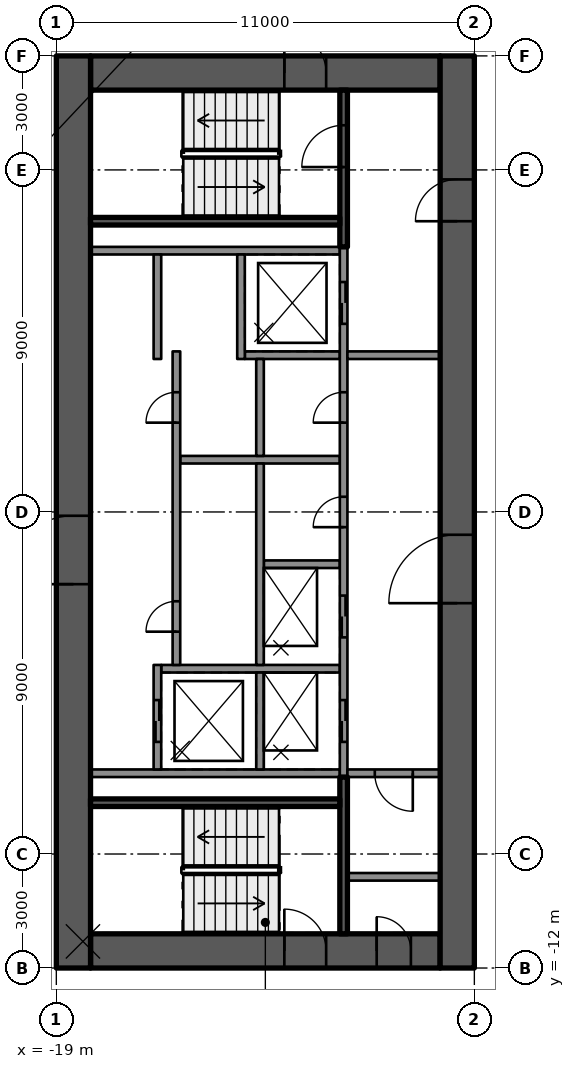
"""IFC4 building model, lengths in metres.
Left out: names, types, materials, properties, quantities, classifications, styles, units other than length and angle.
Written with IfcOpenShell. Run it as: python <this file> out.ifc"""

import sys

from ifc_helpers import new_model, si_unit, direction, frame, frame_2d, origin, place, context, subcontext, project, spatial, rectangle, extrude, element, fill, save


model = new_model("IFC4")
c1 = context("Model", 3, precision=1e-05, world=origin(), true_north=direction((0.0, 1.0)))
c2 = subcontext(c1, "Body", "Model", "MODEL_VIEW")
j1 = project(units=[si_unit("LENGTHUNIT", "METRE"), si_unit("PLANEANGLEUNIT", "RADIAN")], contexts=[c1])
p1 = place(None, origin())
s1 = spatial("IfcSite", under=j1, at=p1, CompositionType="ELEMENT")
p2 = place(p1, origin())
s2 = spatial("IfcBuilding", under=s1, at=p2, CompositionType="ELEMENT")
p3 = place(p2, frame((0.0, 0.0, 210.5)))
s3 = spatial("IfcBuildingStorey", under=s2, at=p3, CompositionType="ELEMENT", Elevation=210.5)
p4 = place(p3, frame((-18.1, 11.55, 0.0), z_axis=(0.0, 0.0, 1.0), x_axis=(1.0, 0.0, 0.0)))
e1 = element("IfcWall", 1, at=p4, inside=s3, PredefinedType="SHEAR", context=c2, shape_type="SweptSolid", body=[
    extrude(rectangle(XDim=9.2, YDim=0.9, at=frame_2d((4.6, 0.0))), origin(), (0.0, 0.0, 1.0), 3.5),
])
p5 = place(p4, frame((5.1, 0.0, 0.0)))
e2 = element("IfcOpeningElement", 2, at=p5, cuts=e1, PredefinedType="OPENING", context=c2, shape_type="SweptSolid", body=[
    extrude(rectangle(XDim=1.1, YDim=2.1, at=frame_2d((0.55, 1.05))), frame((0.0, 0.46, 0.0), z_axis=(0.0, -1.0, 0.0), x_axis=(1.0, 0.0, 0.0)), (0.0, 0.0, 1.0), 0.92),
])
p6 = place(p3, frame((-18.1, -11.55, 0.0), z_axis=(0.0, 0.0, 1.0), x_axis=(1.0, 0.0, 0.0)))
e3 = element("IfcWall", 3, at=p6, inside=s3, PredefinedType="SHEAR", context=c2, shape_type="SweptSolid", body=[
    extrude(rectangle(XDim=9.2, YDim=0.9, at=frame_2d((4.6, 0.0))), origin(), (0.0, 0.0, 1.0), 3.5),
])
p7 = place(p6, frame((5.1, 0.0, 0.0)))
e4 = element("IfcOpeningElement", 4, at=p7, cuts=e3, PredefinedType="OPENING", context=c2, shape_type="SweptSolid", body=[
    extrude(rectangle(XDim=1.1, YDim=2.1, at=frame_2d((0.55, 1.05))), frame((0.0, 0.46, 0.0), z_axis=(0.0, -1.0, 0.0), x_axis=(1.0, 0.0, 0.0)), (0.0, 0.0, 1.0), 0.92),
])
p8 = place(p6, frame((7.53, 0.0, 0.0)))
e5 = element("IfcOpeningElement", 5, at=p8, cuts=e3, PredefinedType="OPENING", context=c2, shape_type="SweptSolid", body=[
    extrude(rectangle(XDim=0.9, YDim=2.1, at=frame_2d((0.45, 1.05))), frame((0.0, 0.46, 0.0), z_axis=(0.0, -1.0, 0.0), x_axis=(1.0, 0.0, 0.0)), (0.0, 0.0, 1.0), 0.92),
])
p9 = place(p3, frame((-18.55, -12.0, 0.0), z_axis=(0.0, 0.0, 1.0), x_axis=(0.0, 1.0, 0.0)))
e6 = element("IfcWall", 6, at=p9, inside=s3, PredefinedType="SHEAR", context=c2, shape_type="SweptSolid", body=[
    extrude(rectangle(XDim=24.0, YDim=0.9, at=frame_2d((12.0, 0.0))), origin(), (0.0, 0.0, 1.0), 3.5),
])
p10 = place(p9, frame((10.1, 0.0, 0.0)))
e7 = element("IfcOpeningElement", 7, at=p10, cuts=e6, PredefinedType="OPENING", context=c2, shape_type="SweptSolid", body=[
    extrude(rectangle(XDim=1.8, YDim=2.1, at=frame_2d((0.9, 1.05))), frame((0.0, 0.46, 0.0), z_axis=(0.0, -1.0, 0.0), x_axis=(1.0, 0.0, 0.0)), (0.0, 0.0, 1.0), 0.92),
])
p11 = place(p3, frame((-8.45, -12.0, 0.0), z_axis=(0.0, 0.0, 1.0), x_axis=(0.0, 1.0, 0.0)))
e8 = element("IfcWall", 8, at=p11, inside=s3, PredefinedType="SHEAR", context=c2, shape_type="SweptSolid", body=[
    extrude(rectangle(XDim=24.0, YDim=0.9, at=frame_2d((12.0, 0.0))), origin(), (0.0, 0.0, 1.0), 3.5),
])
p12 = place(p11, frame((9.6, 0.0, 0.0)))
e9 = element("IfcOpeningElement", 9, at=p12, cuts=e8, PredefinedType="OPENING", context=c2, shape_type="SweptSolid", body=[
    extrude(rectangle(XDim=1.8, YDim=2.1, at=frame_2d((0.9, 1.05))), frame((0.0, 0.46, 0.0), z_axis=(0.0, -1.0, 0.0), x_axis=(1.0, 0.0, 0.0)), (0.0, 0.0, 1.0), 0.92),
])
p13 = place(p11, frame((19.65, 0.0, 0.0)))
e10 = element("IfcOpeningElement", 10, at=p13, cuts=e8, PredefinedType="OPENING", context=c2, shape_type="SweptSolid", body=[
    extrude(rectangle(XDim=1.1, YDim=2.1, at=frame_2d((0.55, 1.05))), frame((0.0, 0.46, 0.0), z_axis=(0.0, -1.0, 0.0), x_axis=(1.0, 0.0, 0.0)), (0.0, 0.0, 1.0), 0.92),
])
for number, where, z_axis, x_axis in (
    (11, (-11.54, 6.875, 0.0), (0.0, 0.0, 1.0), (-1.0, 0.0, 0.0)),
    (12, (-11.54, -6.875, 0.0), (0.0, 0.0, 1.0), (-1.0, 0.0, 0.0)),
):
    element("IfcWall", number, at=place(p3, frame(where, z_axis=z_axis, x_axis=x_axis)), inside=s3, PredefinedType="SOLIDWALL", context=c2, shape_type="SweptSolid", body=[
        extrude(rectangle(XDim=6.56, YDim=0.2, at=frame_2d((3.28, 0.0))), origin(), (0.0, 0.0, 1.0), 3.09),
    ])
p14 = place(p3, frame((-11.54, -4.125, 0.0), z_axis=(0.0, 0.0, 1.0), x_axis=(-1.0, 0.0, 0.0)))
e13 = element("IfcWall", 13, at=p14, inside=s3, PredefinedType="SOLIDWALL", context=c2, shape_type="SweptSolid", body=[
    extrude(rectangle(XDim=4.7, YDim=0.2, at=frame_2d((2.35, 0.0))), origin(), (0.0, 0.0, 1.0), 3.09),
])
p15 = place(p3, frame((-11.54, -1.375, 0.0), z_axis=(0.0, 0.0, 1.0), x_axis=(-1.0, 0.0, 0.0)))
e14 = element("IfcWall", 14, at=p15, inside=s3, PredefinedType="SOLIDWALL", context=c2, shape_type="SweptSolid", body=[
    extrude(rectangle(XDim=2.0, YDim=0.2, at=frame_2d((1.0, 0.0))), origin(), (0.0, 0.0, 1.0), 3.09),
])
p16 = place(p3, frame((-11.54, 1.375, 0.0), z_axis=(0.0, 0.0, 1.0), x_axis=(-1.0, 0.0, 0.0)))
e15 = element("IfcWall", 15, at=p16, inside=s3, PredefinedType="SOLIDWALL", context=c2, shape_type="SweptSolid", body=[
    extrude(rectangle(XDim=4.2, YDim=0.2, at=frame_2d((2.1, 0.0))), origin(), (0.0, 0.0, 1.0), 3.09),
])
p17 = place(p3, frame((-11.54, 4.125, 0.0), z_axis=(0.0, 0.0, 1.0), x_axis=(-1.0, 0.0, 0.0)))
e16 = element("IfcWall", 16, at=p17, inside=s3, PredefinedType="SOLIDWALL", context=c2, shape_type="SweptSolid", body=[
    extrude(rectangle(XDim=2.5, YDim=0.2, at=frame_2d((1.25, 0.0))), origin(), (0.0, 0.0, 1.0), 3.09),
])
p18 = place(p3, frame((-11.44, -6.975, 0.0), z_axis=(0.0, 0.0, 1.0), x_axis=(0.0, 1.0, 0.0)))
e17 = element("IfcWall", 17, at=p18, inside=s3, PredefinedType="SOLIDWALL", context=c2, shape_type="SweptSolid", body=[
    extrude(rectangle(XDim=13.95, YDim=0.2, at=frame_2d((6.975, 0.0))), origin(), (0.0, 0.0, 1.0), 3.09),
])
p19 = place(p18, frame((0.925, 0.0, 0.0)))
e18 = element("IfcOpeningElement", 18, at=p19, cuts=e17, PredefinedType="OPENING", context=c2, shape_type="SweptSolid", body=[
    extrude(rectangle(XDim=1.1, YDim=2.1, at=frame_2d((0.55, 1.05))), frame((0.0, 0.11, 0.0), z_axis=(0.0, -1.0, 0.0), x_axis=(1.0, 0.0, 0.0)), (0.0, 0.0, 1.0), 0.22),
])
p20 = place(p18, frame((3.675, 0.0, 0.0)))
e19 = element("IfcOpeningElement", 19, at=p20, cuts=e17, PredefinedType="OPENING", context=c2, shape_type="SweptSolid", body=[
    extrude(rectangle(XDim=1.1, YDim=2.1, at=frame_2d((0.55, 1.05))), frame((0.0, 0.11, 0.0), z_axis=(0.0, -1.0, 0.0), x_axis=(1.0, 0.0, 0.0)), (0.0, 0.0, 1.0), 0.22),
])
p21 = place(p18, frame((11.925, 0.0, 0.0)))
e20 = element("IfcOpeningElement", 20, at=p21, cuts=e17, PredefinedType="OPENING", context=c2, shape_type="SweptSolid", body=[
    extrude(rectangle(XDim=1.1, YDim=2.1, at=frame_2d((0.55, 1.05))), frame((0.0, 0.11, 0.0), z_axis=(0.0, -1.0, 0.0), x_axis=(1.0, 0.0, 0.0)), (0.0, 0.0, 1.0), 0.22),
])
p22 = place(p18, frame((6.575, 0.0, 0.0)))
e21 = element("IfcOpeningElement", 21, at=p22, cuts=e17, PredefinedType="OPENING", context=c2, shape_type="SweptSolid", body=[
    extrude(rectangle(XDim=0.8, YDim=2.1, at=frame_2d((0.4, 1.05))), frame((0.0, 0.11, 0.0), z_axis=(0.0, -1.0, 0.0), x_axis=(1.0, 0.0, 0.0)), (0.0, 0.0, 1.0), 0.22),
])
p23 = place(p18, frame((9.325, 0.0, 0.0)))
e22 = element("IfcOpeningElement", 22, at=p23, cuts=e17, PredefinedType="OPENING", context=c2, shape_type="SweptSolid", body=[
    extrude(rectangle(XDim=0.8, YDim=2.1, at=frame_2d((0.4, 1.05))), frame((0.0, 0.11, 0.0), z_axis=(0.0, -1.0, 0.0), x_axis=(1.0, 0.0, 0.0)), (0.0, 0.0, 1.0), 0.22),
])
p24 = place(p3, frame((-13.64, -6.775, 0.0), z_axis=(0.0, 0.0, 1.0), x_axis=(0.0, 1.0, 0.0)))
e23 = element("IfcWall", 23, at=p24, inside=s3, PredefinedType="SOLIDWALL", context=c2, shape_type="SweptSolid", body=[
    extrude(rectangle(XDim=2.55, YDim=0.2, at=frame_2d((1.275, 0.0))), origin(), (0.0, 0.0, 1.0), 3.09),
])
p25 = place(p3, frame((-13.64, -4.025, 0.0), z_axis=(0.0, 0.0, 1.0), x_axis=(0.0, 1.0, 0.0)))
e24 = element("IfcWall", 24, at=p25, inside=s3, PredefinedType="SOLIDWALL", context=c2, shape_type="SweptSolid", body=[
    extrude(rectangle(XDim=5.3, YDim=0.2, at=frame_2d((2.65, 0.0))), origin(), (0.0, 0.0, 1.0), 3.09),
])
p26 = place(p3, frame((-13.64, 1.475, 0.0), z_axis=(0.0, 0.0, 1.0), x_axis=(0.0, 1.0, 0.0)))
e25 = element("IfcWall", 25, at=p26, inside=s3, PredefinedType="SOLIDWALL", context=c2, shape_type="SweptSolid", body=[
    extrude(rectangle(XDim=2.55, YDim=0.2, at=frame_2d((1.275, 0.0))), origin(), (0.0, 0.0, 1.0), 3.09),
])
p27 = place(p3, frame((-14.14, 4.025, 0.0), z_axis=(0.0, 0.0, 1.0), x_axis=(0.0, 1.0, 0.0)))
e26 = element("IfcWall", 26, at=p27, inside=s3, PredefinedType="SOLIDWALL", context=c2, shape_type="SweptSolid", body=[
    extrude(rectangle(XDim=2.75, YDim=0.2, at=frame_2d((1.375, 0.0))), origin(), (0.0, 0.0, 1.0), 3.09),
])
p28 = place(p3, frame((-16.34, -6.775, 0.0), z_axis=(0.0, 0.0, 1.0), x_axis=(0.0, 1.0, 0.0)))
e27 = element("IfcWall", 27, at=p28, inside=s3, PredefinedType="SOLIDWALL", context=c2, shape_type="SweptSolid", body=[
    extrude(rectangle(XDim=2.75, YDim=0.2, at=frame_2d((1.375, 0.0))), origin(), (0.0, 0.0, 1.0), 3.09),
])
p29 = place(p28, frame((0.725, 0.0, 0.0)))
e28 = element("IfcOpeningElement", 28, at=p29, cuts=e27, PredefinedType="OPENING", context=c2, shape_type="SweptSolid", body=[
    extrude(rectangle(XDim=1.1, YDim=2.1, at=frame_2d((0.55, 1.05))), frame((0.0, 0.11, 0.0), z_axis=(0.0, -1.0, 0.0), x_axis=(1.0, 0.0, 0.0)), (0.0, 0.0, 1.0), 0.22),
])
p30 = place(p3, frame((-15.84, -4.025, 0.0), z_axis=(0.0, 0.0, 1.0), x_axis=(0.0, 1.0, 0.0)))
e29 = element("IfcWall", 29, at=p30, inside=s3, PredefinedType="SOLIDWALL", context=c2, shape_type="SweptSolid", body=[
    extrude(rectangle(XDim=8.25, YDim=0.2, at=frame_2d((4.125, 0.0))), origin(), (0.0, 0.0, 1.0), 3.09),
])
p31 = place(p30, frame((0.875, 0.0, 0.0)))
e30 = element("IfcOpeningElement", 30, at=p31, cuts=e29, PredefinedType="OPENING", context=c2, shape_type="SweptSolid", body=[
    extrude(rectangle(XDim=0.8, YDim=2.1, at=frame_2d((0.4, 1.05))), frame((0.0, 0.11, 0.0), z_axis=(0.0, -1.0, 0.0), x_axis=(1.0, 0.0, 0.0)), (0.0, 0.0, 1.0), 0.22),
])
p32 = place(p30, frame((6.375, 0.0, 0.0)))
e31 = element("IfcOpeningElement", 31, at=p32, cuts=e29, PredefinedType="OPENING", context=c2, shape_type="SweptSolid", body=[
    extrude(rectangle(XDim=0.8, YDim=2.1, at=frame_2d((0.4, 1.05))), frame((0.0, 0.11, 0.0), z_axis=(0.0, -1.0, 0.0), x_axis=(1.0, 0.0, 0.0)), (0.0, 0.0, 1.0), 0.22),
])
p33 = place(p3, frame((-16.34, 4.025, 0.0), z_axis=(0.0, 0.0, 1.0), x_axis=(0.0, 1.0, 0.0)))
e32 = element("IfcWall", 32, at=p33, inside=s3, PredefinedType="SOLIDWALL", context=c2, shape_type="SweptSolid", body=[
    extrude(rectangle(XDim=2.75, YDim=0.2, at=frame_2d((1.375, 0.0))), origin(), (0.0, 0.0, 1.0), 3.09),
])
p34 = place(p3, frame((-11.44, 6.975, 0.0), z_axis=(0.0, 0.0, 1.0), x_axis=(0.0, 1.0, 0.0)))
e33 = element("IfcWall", 33, at=p34, inside=s3, PredefinedType="SOLIDWALL", context=c2, shape_type="SweptSolid", body=[
    extrude(rectangle(XDim=4.125, YDim=0.2, at=frame_2d((2.062, 0.0))), origin(), (0.0, 0.0, 1.0), 3.09),
])
p35 = place(p34, frame((2.1, 0.0, 0.0)))
e34 = element("IfcOpeningElement", 34, at=p35, cuts=e33, PredefinedType="OPENING", context=c2, shape_type="SweptSolid", body=[
    extrude(rectangle(XDim=1.1, YDim=2.1, at=frame_2d((0.55, 1.05))), frame((0.0, 0.11, 0.0), z_axis=(0.0, -1.0, 0.0), x_axis=(1.0, 0.0, 0.0)), (0.0, 0.0, 1.0), 0.22),
])
p36 = place(p3, frame((-11.54, 7.65, 0.0), z_axis=(0.0, 0.0, 1.0), x_axis=(-1.0, 0.0, 0.0)))
e35 = element("IfcWall", 35, at=p36, inside=s3, PredefinedType="SOLIDWALL", context=c2, shape_type="SweptSolid", body=[
    extrude(rectangle(XDim=6.56, YDim=0.2, at=frame_2d((3.28, 0.0))), origin(), (0.0, 0.0, 1.0), 3.09),
])
p37 = place(p3, frame((-11.44, -11.1, 0.0), z_axis=(0.0, 0.0, 1.0), x_axis=(0.0, 1.0, 0.0)))
e36 = element("IfcWall", 36, at=p37, inside=s3, PredefinedType="SOLIDWALL", context=c2, shape_type="SweptSolid", body=[
    extrude(rectangle(XDim=4.125, YDim=0.2, at=frame_2d((2.062, 0.0))), origin(), (0.0, 0.0, 1.0), 3.09),
])
p38 = place(p3, frame((-11.54, -7.65, 0.0), z_axis=(0.0, 0.0, 1.0), x_axis=(-1.0, 0.0, 0.0)))
e37 = element("IfcWall", 37, at=p38, inside=s3, PredefinedType="SOLIDWALL", context=c2, shape_type="SweptSolid", body=[
    extrude(rectangle(XDim=6.56, YDim=0.2, at=frame_2d((3.28, 0.0))), origin(), (0.0, 0.0, 1.0), 3.09),
])
p39 = place(p3, frame((-8.9, 4.125, 0.0), z_axis=(0.0, 0.0, 1.0), x_axis=(-1.0, 0.0, 0.0)))
e38 = element("IfcWall", 38, at=p39, inside=s3, PredefinedType="PARTITIONING", context=c2, shape_type="SweptSolid", body=[
    extrude(rectangle(XDim=2.44, YDim=0.2, at=frame_2d((1.22, 0.0))), origin(), (0.0, 0.0, 1.0), 3.09),
])
p40 = place(p3, frame((-8.9, -6.875, 0.0), z_axis=(0.0, 0.0, 1.0), x_axis=(-1.0, 0.0, 0.0)))
e39 = element("IfcWall", 39, at=p40, inside=s3, PredefinedType="PARTITIONING", context=c2, shape_type="SweptSolid", body=[
    extrude(rectangle(XDim=2.44, YDim=0.2, at=frame_2d((1.22, 0.0))), origin(), (0.0, 0.0, 1.0), 3.09),
])
p41 = place(p40, frame((0.72, 0.0, 0.0)))
e40 = element("IfcOpeningElement", 40, at=p41, cuts=e39, PredefinedType="OPENING", context=c2, shape_type="SweptSolid", body=[
    extrude(rectangle(XDim=1.0, YDim=2.1, at=frame_2d((0.5, 1.05))), frame((0.0, 0.11, 0.0), z_axis=(0.0, -1.0, 0.0), x_axis=(1.0, 0.0, 0.0)), (0.0, 0.0, 1.0), 0.22),
])
p42 = place(p3, frame((-8.9, -9.6, 0.0), z_axis=(0.0, 0.0, 1.0), x_axis=(-1.0, 0.0, 0.0)))
e41 = element("IfcWall", 41, at=p42, inside=s3, PredefinedType="PARTITIONING", context=c2, shape_type="SweptSolid", body=[
    extrude(rectangle(XDim=2.44, YDim=0.2, at=frame_2d((1.22, 0.0))), origin(), (0.0, 0.0, 1.0), 3.09),
])
p43 = place(p19, origin())
e42 = element("IfcDoor", 42, at=p43, inside=s3, OperationType="DOUBLE_DOOR_SLIDING", PredefinedType="DOOR", context=c2, shape_type="SweptSolid", body=[
    extrude(rectangle(XDim=1.1, YDim=2.1, at=frame_2d((0.55, 1.05))), frame((0.0, 0.025, 0.0), z_axis=(0.0, -1.0, 0.0), x_axis=(1.0, 0.0, 0.0)), (0.0, 0.0, 1.0), 0.05),
])
fill(e18, e42)
p44 = place(p29, origin())
e43 = element("IfcDoor", 43, at=p44, inside=s3, OperationType="DOUBLE_DOOR_SLIDING", PredefinedType="DOOR", context=c2, shape_type="SweptSolid", body=[
    extrude(rectangle(XDim=1.1, YDim=2.1, at=frame_2d((0.55, 1.05))), frame((0.0, 0.025, 0.0), z_axis=(0.0, -1.0, 0.0), x_axis=(1.0, 0.0, 0.0)), (0.0, 0.0, 1.0), 0.05),
])
fill(e28, e43)
p45 = place(p20, origin())
e44 = element("IfcDoor", 44, at=p45, inside=s3, OperationType="DOUBLE_DOOR_SLIDING", PredefinedType="DOOR", context=c2, shape_type="SweptSolid", body=[
    extrude(rectangle(XDim=1.1, YDim=2.1, at=frame_2d((0.55, 1.05))), frame((0.0, 0.025, 0.0), z_axis=(0.0, -1.0, 0.0), x_axis=(1.0, 0.0, 0.0)), (0.0, 0.0, 1.0), 0.05),
])
fill(e19, e44)
p46 = place(p21, origin())
e45 = element("IfcDoor", 45, at=p46, inside=s3, OperationType="DOUBLE_DOOR_SLIDING", PredefinedType="DOOR", context=c2, shape_type="SweptSolid", body=[
    extrude(rectangle(XDim=1.1, YDim=2.1, at=frame_2d((0.55, 1.05))), frame((0.0, 0.025, 0.0), z_axis=(0.0, -1.0, 0.0), x_axis=(1.0, 0.0, 0.0)), (0.0, 0.0, 1.0), 0.05),
])
fill(e20, e45)
p47 = place(p31, origin())
e46 = element("IfcDoor", 46, at=p47, inside=s3, OperationType="SINGLE_SWING_LEFT", PredefinedType="DOOR", context=c2, shape_type="SweptSolid", body=[
    extrude(rectangle(XDim=0.8, YDim=2.1, at=frame_2d((0.4, 1.05))), frame((0.0, 0.025, 0.0), z_axis=(0.0, -1.0, 0.0), x_axis=(1.0, 0.0, 0.0)), (0.0, 0.0, 1.0), 0.05),
])
fill(e30, e46)
p48 = place(p22, origin())
e47 = element("IfcDoor", 47, at=p48, inside=s3, OperationType="SINGLE_SWING_LEFT", PredefinedType="DOOR", context=c2, shape_type="SweptSolid", body=[
    extrude(rectangle(XDim=0.8, YDim=2.1, at=frame_2d((0.4, 1.05))), frame((0.0, 0.025, 0.0), z_axis=(0.0, -1.0, 0.0), x_axis=(1.0, 0.0, 0.0)), (0.0, 0.0, 1.0), 0.05),
])
fill(e21, e47)
p49 = place(p23, origin())
e48 = element("IfcDoor", 48, at=p49, inside=s3, OperationType="SINGLE_SWING_LEFT", PredefinedType="DOOR", context=c2, shape_type="SweptSolid", body=[
    extrude(rectangle(XDim=0.8, YDim=2.1, at=frame_2d((0.4, 1.05))), frame((0.0, 0.025, 0.0), z_axis=(0.0, -1.0, 0.0), x_axis=(1.0, 0.0, 0.0)), (0.0, 0.0, 1.0), 0.05),
])
fill(e22, e48)
p50 = place(p32, origin())
e49 = element("IfcDoor", 49, at=p50, inside=s3, OperationType="SINGLE_SWING_LEFT", PredefinedType="DOOR", context=c2, shape_type="SweptSolid", body=[
    extrude(rectangle(XDim=0.8, YDim=2.1, at=frame_2d((0.4, 1.05))), frame((0.0, 0.025, 0.0), z_axis=(0.0, -1.0, 0.0), x_axis=(1.0, 0.0, 0.0)), (0.0, 0.0, 1.0), 0.05),
])
fill(e31, e49)
p51 = place(p12, origin())
e50 = element("IfcDoor", 50, at=p51, inside=s3, OperationType="SINGLE_SWING_LEFT", PredefinedType="DOOR", context=c2, shape_type="SweptSolid", body=[
    extrude(rectangle(XDim=1.8, YDim=2.1, at=frame_2d((0.9, 1.05))), frame((0.0, 0.025, 0.0), z_axis=(0.0, -1.0, 0.0), x_axis=(1.0, 0.0, 0.0)), (0.0, 0.0, 1.0), 0.05),
])
fill(e9, e50)
p52 = place(p10, origin())
e51 = element("IfcDoor", 51, at=p52, inside=s3, OperationType="SINGLE_SWING_LEFT", PredefinedType="DOOR", context=c2, shape_type="SweptSolid", body=[
    extrude(rectangle(XDim=1.8, YDim=2.1, at=frame_2d((0.9, 1.05))), frame((0.0, 0.025, 0.0), z_axis=(0.0, -1.0, 0.0), x_axis=(1.0, 0.0, 0.0)), (0.0, 0.0, 1.0), 0.05),
])
fill(e7, e51)
p53 = place(p13, origin())
e52 = element("IfcDoor", 52, at=p53, inside=s3, OperationType="SINGLE_SWING_RIGHT", PredefinedType="DOOR", context=c2, shape_type="SweptSolid", body=[
    extrude(rectangle(XDim=1.1, YDim=2.1, at=frame_2d((0.55, 1.05))), frame((0.0, 0.025, 0.0), z_axis=(0.0, -1.0, 0.0), x_axis=(1.0, 0.0, 0.0)), (0.0, 0.0, 1.0), 0.05),
])
fill(e10, e52)
p54 = place(p5, origin())
e53 = element("IfcDoor", 53, at=p54, inside=s3, OperationType="SINGLE_SWING_RIGHT", PredefinedType="DOOR", context=c2, shape_type="SweptSolid", body=[
    extrude(rectangle(XDim=1.1, YDim=2.1, at=frame_2d((0.55, 1.05))), frame((0.0, 0.025, 0.0), z_axis=(0.0, -1.0, 0.0), x_axis=(1.0, 0.0, 0.0)), (0.0, 0.0, 1.0), 0.05),
])
fill(e2, e53)
p55 = place(p7, origin())
e54 = element("IfcDoor", 54, at=p55, inside=s3, OperationType="SINGLE_SWING_RIGHT", PredefinedType="DOOR", context=c2, shape_type="SweptSolid", body=[
    extrude(rectangle(XDim=1.1, YDim=2.1, at=frame_2d((0.55, 1.05))), frame((0.0, 0.025, 0.0), z_axis=(0.0, -1.0, 0.0), x_axis=(1.0, 0.0, 0.0)), (0.0, 0.0, 1.0), 0.05),
])
fill(e4, e54)
p56 = place(p35, origin())
e55 = element("IfcDoor", 55, at=p56, inside=s3, OperationType="SINGLE_SWING_RIGHT", PredefinedType="DOOR", context=c2, shape_type="SweptSolid", body=[
    extrude(rectangle(XDim=1.1, YDim=2.1, at=frame_2d((0.55, 1.05))), frame((0.0, 0.025, 0.0), z_axis=(0.0, -1.0, 0.0), x_axis=(1.0, 0.0, 0.0)), (0.0, 0.0, 1.0), 0.05),
])
fill(e34, e55)
p57 = place(p8, origin())
e56 = element("IfcDoor", 56, at=p57, inside=s3, OperationType="SINGLE_SWING_RIGHT", PredefinedType="DOOR", context=c2, shape_type="SweptSolid", body=[
    extrude(rectangle(XDim=0.9, YDim=2.1, at=frame_2d((0.45, 1.05))), frame((0.0, 0.025, 0.0), z_axis=(0.0, -1.0, 0.0), x_axis=(1.0, 0.0, 0.0)), (0.0, 0.0, 1.0), 0.05),
])
fill(e5, e56)
p58 = place(p41, origin())
e57 = element("IfcDoor", 57, at=p58, inside=s3, OperationType="SINGLE_SWING_RIGHT", PredefinedType="DOOR", context=c2, shape_type="SweptSolid", body=[
    extrude(rectangle(XDim=1.0, YDim=2.1, at=frame_2d((0.5, 1.05))), frame((0.0, 0.025, 0.0), z_axis=(0.0, -1.0, 0.0), x_axis=(1.0, 0.0, 0.0)), (0.0, 0.0, 1.0), 0.05),
])
fill(e40, e57)
save(model, sys.argv[1])
